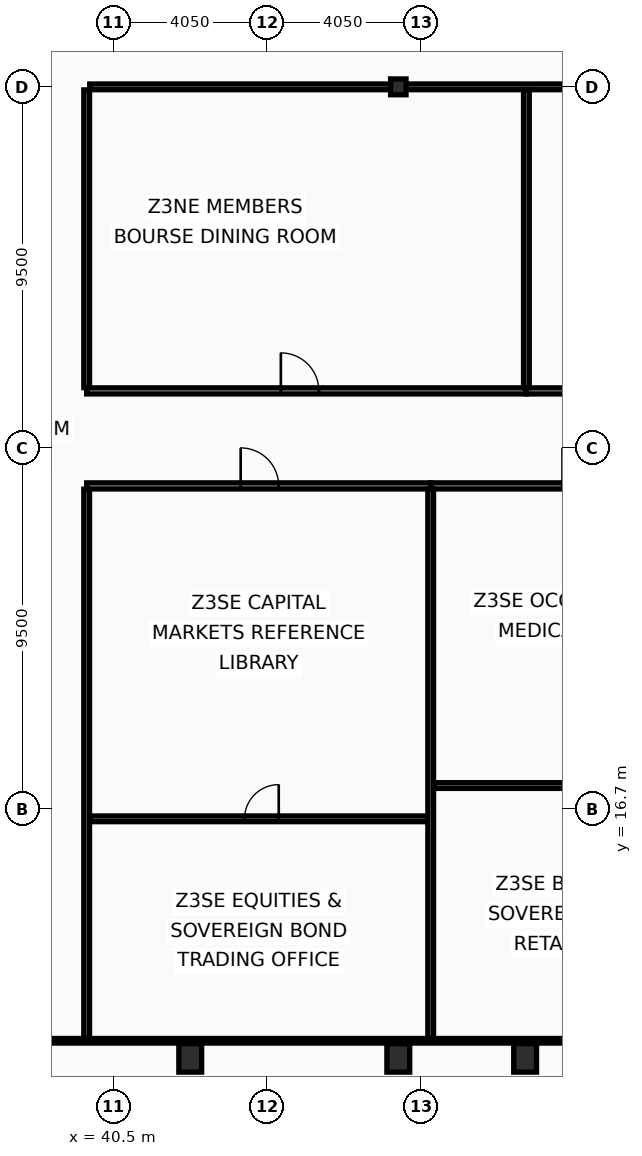
"""IFC4 building model, lengths in metres.
Left out: names, types, materials, properties, quantities, classifications, styles, units other than length and angle.
Written with IfcOpenShell. Run it as: python <this file> out.ifc"""

import sys

from ifc_helpers import new_model, si_unit, direction, frame, frame_2d, origin, origin_2d, place, context, subcontext, project, spatial, rectangle, hollow_rectangle, i_section, extrude, element, fill, save


model = new_model("IFC4")
c1 = context("Model", 3, precision=1e-05, world=origin(), true_north=direction((0.0, 1.0)))
c2 = subcontext(c1, "Body", "Model", "MODEL_VIEW")
j1 = project(units=[si_unit("LENGTHUNIT", "METRE"), si_unit("PLANEANGLEUNIT", "RADIAN")], contexts=[c1])
p1 = place(None, origin())
s1 = spatial("IfcSite", under=j1, at=p1, CompositionType="ELEMENT")
p2 = place(p1, origin())
s2 = spatial("IfcBuilding", under=s1, at=p2, CompositionType="ELEMENT")
p3 = place(p2, frame((0.0, 0.0, 231.8)))
s3 = spatial("IfcBuildingStorey", under=s2, at=p3, CompositionType="ELEMENT", Elevation=231.8)
for number, where, z_axis, x_axis in (
    (1, (42.525, 10.15, 0.0), (0.0, 0.0, 1.0), (1.0, 0.0, 0.0)),
    (2, (48.0, 10.15, 0.0), (0.0, 0.0, 1.0), (1.0, 0.0, 0.0)),
    (3, (51.337, 10.15, 0.0), (0.0, 0.0, 1.0), (1.0, 0.0, 0.0)),
):
    element("IfcColumn", number, at=place(p3, frame(where, z_axis=z_axis, x_axis=x_axis)), inside=s3, PredefinedType="COLUMN", context=c2, shape_type="SweptSolid", body=[
        extrude(hollow_rectangle(XDim=0.6, YDim=0.75, WallThickness=0.045, at=origin_2d()), origin(), (0.0, 0.0, 1.0), 3.6),
    ])
p4 = place(p3, frame((48.0, 35.7, 0.0), z_axis=(0.0, 0.0, 1.0), x_axis=(1.0, 0.0, 0.0)))
e4 = element("IfcColumn", 4, at=p4, inside=s3, PredefinedType="COLUMN", context=c2, shape_type="SweptSolid", body=[
    extrude(i_section(OverallWidth=0.406, OverallDepth=0.416, WebThickness=0.03, FlangeThickness=0.048, at=origin_2d()), origin(), (0.0, 0.0, 1.0), 3.6),
])
p5 = place(p3, frame((39.8, 10.665, 0.0), z_axis=(0.0, 0.0, 1.0), x_axis=(0.0, 1.0, 0.0)))
e5 = element("IfcWall", 5, at=p5, inside=s3, PredefinedType="PARTITIONING", context=c2, shape_type="SweptSolid", body=[
    extrude(rectangle(XDim=14.45, YDim=0.15, at=frame_2d((7.225, 0.0))), origin(), (0.0, 0.0, 1.0), 2.98),
])
p6 = place(p3, frame((39.8, 27.785, 0.0), z_axis=(0.0, 0.0, 1.0), x_axis=(0.0, 1.0, 0.0)))
e6 = element("IfcWall", 6, at=p6, inside=s3, PredefinedType="PARTITIONING", context=c2, shape_type="SweptSolid", body=[
    extrude(rectangle(XDim=7.835, YDim=0.15, at=frame_2d((3.917, 0.0))), origin(), (0.0, 0.0, 1.0), 2.98),
])
p7 = place(p3, frame((39.88, 35.7, 0.0), z_axis=(0.0, 0.0, 1.0), x_axis=(1.0, 0.0, 0.0)))
e7 = element("IfcWall", 7, at=p7, inside=s3, PredefinedType="PARTITIONING", context=c2, shape_type="SweptSolid", body=[
    extrude(rectangle(XDim=24.925, YDim=0.15, at=frame_2d((12.462, 0.0))), origin(), (0.0, 0.0, 1.0), 2.78),
])
p8 = place(p3, frame((39.8, 25.2, 0.0), z_axis=(0.0, 0.0, 1.0), x_axis=(1.0, 0.0, 0.0)))
e8 = element("IfcWall", 8, at=p8, inside=s3, PredefinedType="PARTITIONING", context=c2, shape_type="SweptSolid", body=[
    extrude(rectangle(XDim=9.053, YDim=0.16, at=frame_2d((4.526, 0.0))), origin(), (0.0, 0.0, 1.0), 2.78),
])
p9 = place(p8, frame((4.052, 0.0, 0.0)))
e9 = element("IfcOpeningElement", 9, at=p9, cuts=e8, PredefinedType="OPENING", context=c2, shape_type="SweptSolid", body=[
    extrude(rectangle(XDim=1.0, YDim=2.05, at=frame_2d((0.5, 1.025))), frame((0.0, 0.09, 0.0), z_axis=(0.0, -1.0, 0.0), x_axis=(1.0, 0.0, 0.0)), (0.0, 0.0, 1.0), 0.18),
])
p10 = place(p3, frame((39.88, 16.44, 0.0), z_axis=(0.0, 0.0, 1.0), x_axis=(1.0, 0.0, 0.0)))
e10 = element("IfcWall", 10, at=p10, inside=s3, PredefinedType="PARTITIONING", context=c2, shape_type="SweptSolid", body=[
    extrude(rectangle(XDim=8.893, YDim=0.15, at=frame_2d((4.447, 0.0))), origin(), (0.0, 0.0, 1.0), 2.78),
])
p11 = place(p10, frame((4.074, 0.0, 0.0)))
e11 = element("IfcOpeningElement", 11, at=p11, cuts=e10, PredefinedType="OPENING", context=c2, shape_type="SweptSolid", body=[
    extrude(rectangle(XDim=0.9, YDim=2.05, at=frame_2d((0.45, 1.025))), frame((0.0, 0.085, 0.0), z_axis=(0.0, -1.0, 0.0), x_axis=(1.0, 0.0, 0.0)), (0.0, 0.0, 1.0), 0.17),
])
p12 = place(p3, frame((48.853, 25.2, 0.0), z_axis=(0.0, 0.0, 1.0), x_axis=(1.0, 0.0, 0.0)))
e12 = element("IfcWall", 12, at=p12, inside=s3, PredefinedType="PARTITIONING", context=c2, shape_type="SweptSolid", body=[
    extrude(rectangle(XDim=7.66, YDim=0.16, at=frame_2d((3.83, 0.0))), origin(), (0.0, 0.0, 1.0), 2.78),
])
p13 = place(p12, frame((3.467, 0.0, 0.0)))
e13 = element("IfcOpeningElement", 13, at=p13, cuts=e12, PredefinedType="OPENING", context=c2, shape_type="SweptSolid", body=[
    extrude(rectangle(XDim=1.0, YDim=2.05, at=frame_2d((0.5, 1.025))), frame((0.0, 0.09, 0.0), z_axis=(0.0, -1.0, 0.0), x_axis=(1.0, 0.0, 0.0)), (0.0, 0.0, 1.0), 0.18),
])
p14 = place(p3, frame((48.853, 10.665, 0.0), z_axis=(0.0, 0.0, 1.0), x_axis=(0.0, 1.0, 0.0)))
e14 = element("IfcWall", 14, at=p14, inside=s3, PredefinedType="PARTITIONING", context=c2, shape_type="SweptSolid", body=[
    extrude(rectangle(XDim=14.45, YDim=0.15, at=frame_2d((7.225, 0.0))), origin(), (0.0, 0.0, 1.0), 2.98),
])
p15 = place(p3, frame((48.933, 17.316, 0.0), z_axis=(0.0, 0.0, 1.0), x_axis=(1.0, 0.0, 0.0)))
e15 = element("IfcWall", 15, at=p15, inside=s3, PredefinedType="PARTITIONING", context=c2, shape_type="SweptSolid", body=[
    extrude(rectangle(XDim=7.5, YDim=0.15, at=frame_2d((3.75, 0.0))), origin(), (0.0, 0.0, 1.0), 2.78),
])
p16 = place(p15, frame((3.447, 0.0, 0.0)))
e16 = element("IfcOpeningElement", 16, at=p16, cuts=e15, PredefinedType="OPENING", context=c2, shape_type="SweptSolid", body=[
    extrude(rectangle(XDim=0.9, YDim=2.05, at=frame_2d((0.45, 1.025))), frame((0.0, 0.085, 0.0), z_axis=(0.0, -1.0, 0.0), x_axis=(1.0, 0.0, 0.0)), (0.0, 0.0, 1.0), 0.17),
])
p17 = place(p3, frame((39.8, 27.7, 0.0), z_axis=(0.0, 0.0, 1.0), x_axis=(1.0, 0.0, 0.0)))
e17 = element("IfcWall", 17, at=p17, inside=s3, PredefinedType="PARTITIONING", context=c2, shape_type="SweptSolid", body=[
    extrude(rectangle(XDim=11.571, YDim=0.16, at=frame_2d((5.785, 0.0))), origin(), (0.0, 0.0, 1.0), 2.78),
])
p18 = place(p17, frame((5.11, 0.0, 0.0)))
e18 = element("IfcOpeningElement", 18, at=p18, cuts=e17, PredefinedType="OPENING", context=c2, shape_type="SweptSolid", body=[
    extrude(rectangle(XDim=1.0, YDim=2.05, at=frame_2d((0.5, 1.025))), frame((0.0, 0.09, 0.0), z_axis=(0.0, -1.0, 0.0), x_axis=(1.0, 0.0, 0.0)), (0.0, 0.0, 1.0), 0.18),
])
p19 = place(p3, frame((51.371, 27.7, 0.0), z_axis=(0.0, 0.0, 1.0), x_axis=(1.0, 0.0, 0.0)))
e19 = element("IfcWall", 19, at=p19, inside=s3, PredefinedType="PARTITIONING", context=c2, shape_type="SweptSolid", body=[
    extrude(rectangle(XDim=13.499, YDim=0.16, at=frame_2d((6.75, 0.0))), origin(), (0.0, 0.0, 1.0), 2.78),
])
p20 = place(p19, frame((5.92, 0.0, 0.0)))
e20 = element("IfcOpeningElement", 20, at=p20, cuts=e19, PredefinedType="OPENING", context=c2, shape_type="SweptSolid", body=[
    extrude(rectangle(XDim=1.0, YDim=2.05, at=frame_2d((0.5, 1.025))), frame((0.0, 0.09, 0.0), z_axis=(0.0, -1.0, 0.0), x_axis=(1.0, 0.0, 0.0)), (0.0, 0.0, 1.0), 0.18),
])
p21 = place(p3, frame((51.371, 27.785, 0.0), z_axis=(0.0, 0.0, 1.0), x_axis=(0.0, 1.0, 0.0)))
e21 = element("IfcWall", 21, at=p21, inside=s3, PredefinedType="PARTITIONING", context=c2, shape_type="SweptSolid", body=[
    extrude(rectangle(XDim=7.835, YDim=0.15, at=frame_2d((3.917, 0.0))), origin(), (0.0, 0.0, 1.0), 2.98),
])
p22 = place(p3, frame((8.095, 10.6, 0.0), z_axis=(0.0, 0.0, 1.0), x_axis=(1.0, 0.0, 0.0)))
e22 = element("IfcWall", 22, at=p22, inside=s3, PredefinedType="PARTITIONING", context=c2, shape_type="SweptSolid", body=[
    extrude(rectangle(XDim=56.71, YDim=0.12, at=frame_2d((28.355, 0.0))), origin(), (0.0, 0.0, 1.0), 2.78),
])
p23 = place(p9, origin())
e23 = element("IfcDoor", 23, at=p23, inside=s3, OperationType="SINGLE_SWING_LEFT", PredefinedType="DOOR", context=c2, shape_type="SweptSolid", body=[
    extrude(rectangle(XDim=1.0, YDim=2.05, at=frame_2d((0.5, 1.025))), frame((0.0, 0.025, 0.0), z_axis=(0.0, -1.0, 0.0), x_axis=(1.0, 0.0, 0.0)), (0.0, 0.0, 1.0), 0.05),
])
fill(e9, e23)
p24 = place(p11, origin())
e24 = element("IfcDoor", 24, at=p24, inside=s3, OperationType="SINGLE_SWING_RIGHT", PredefinedType="DOOR", context=c2, shape_type="SweptSolid", body=[
    extrude(rectangle(XDim=0.9, YDim=2.05, at=frame_2d((0.45, 1.025))), frame((0.0, 0.025, 0.0), z_axis=(0.0, -1.0, 0.0), x_axis=(1.0, 0.0, 0.0)), (0.0, 0.0, 1.0), 0.05),
])
fill(e11, e24)
p25 = place(p18, origin())
e25 = element("IfcDoor", 25, at=p25, inside=s3, OperationType="SINGLE_SWING_LEFT", PredefinedType="DOOR", context=c2, shape_type="SweptSolid", body=[
    extrude(rectangle(XDim=1.0, YDim=2.05, at=frame_2d((0.5, 1.025))), frame((0.0, 0.025, 0.0), z_axis=(0.0, -1.0, 0.0), x_axis=(1.0, 0.0, 0.0)), (0.0, 0.0, 1.0), 0.05),
])
fill(e18, e25)
save(model, sys.argv[1])
